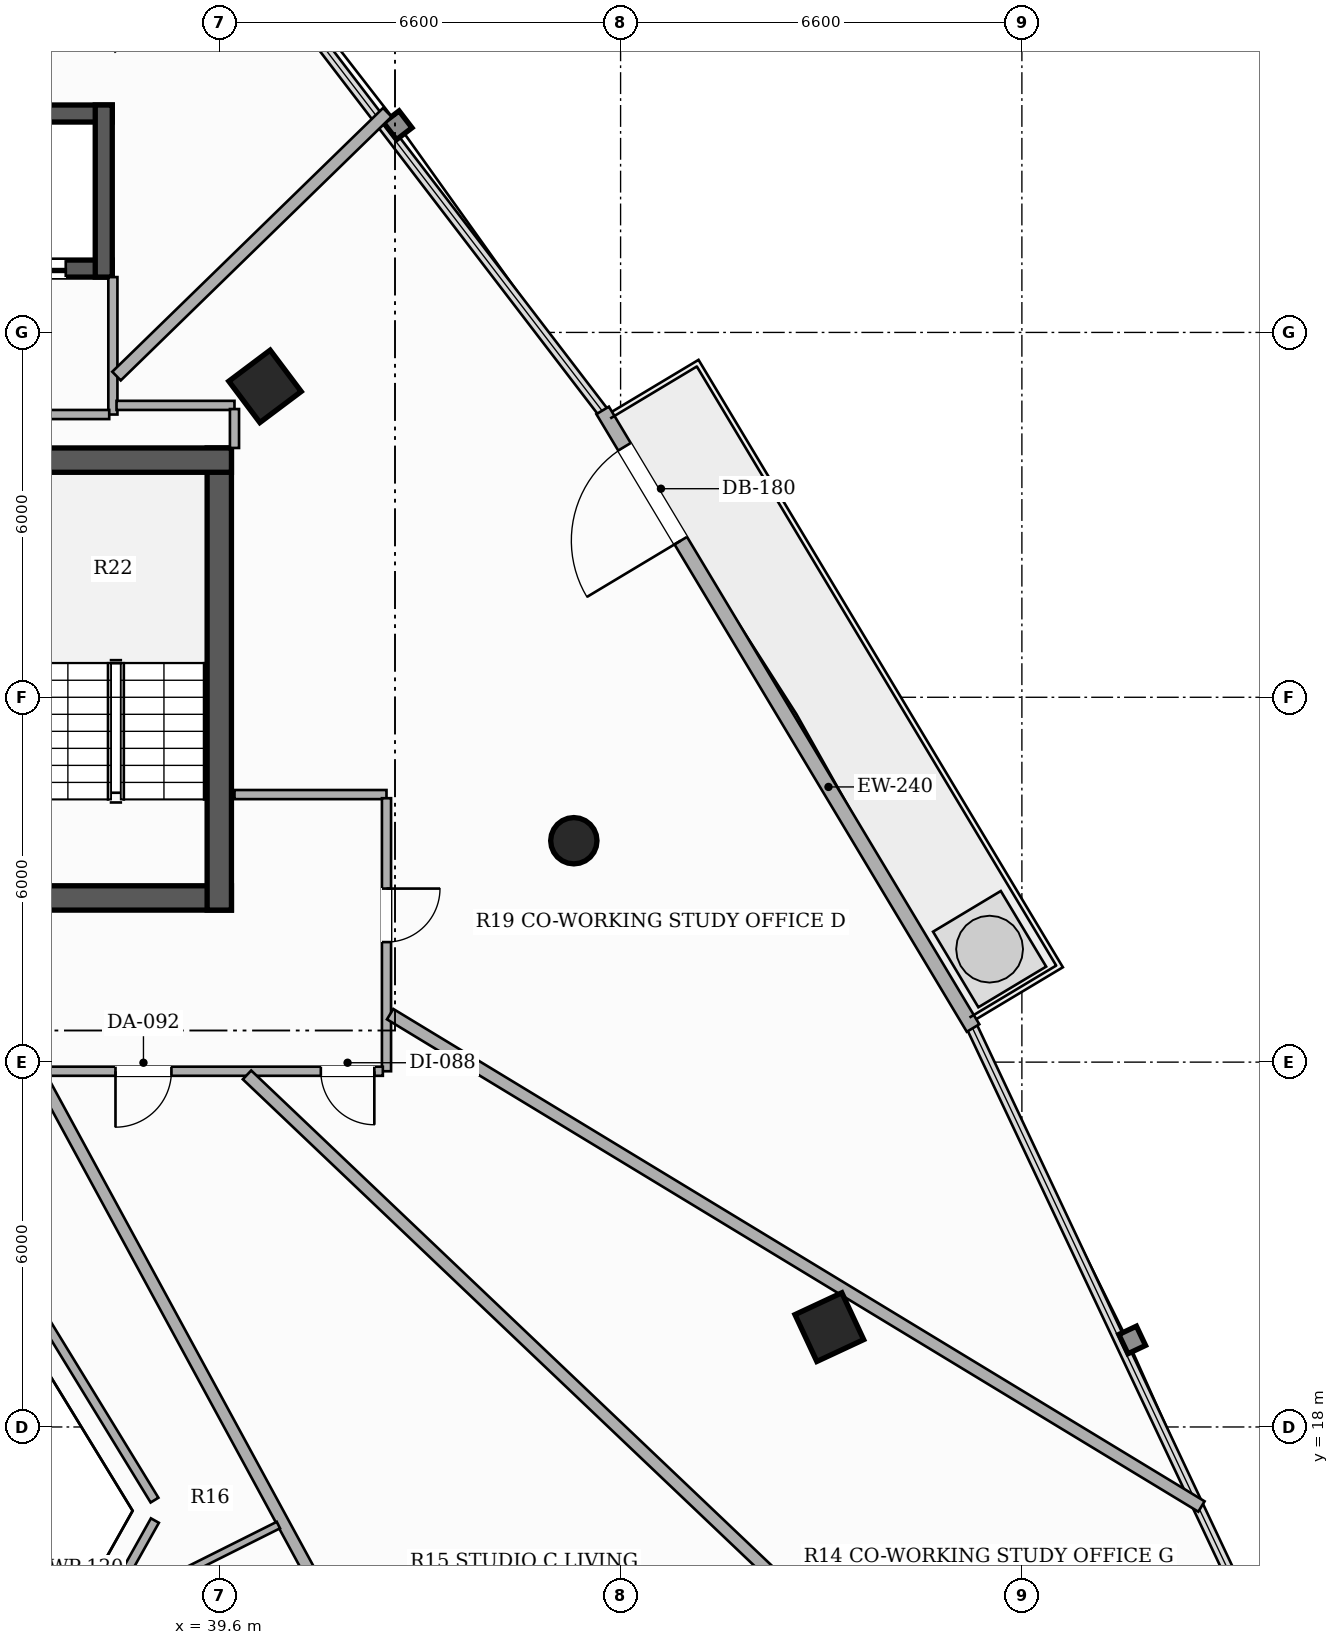
"""IFC4 building model, lengths in metres.
Left out: names, types, materials, properties, quantities, classifications, styles, units other than length and angle.
Written with IfcOpenShell. Run it as: python <this file> out.ifc"""

import sys

from ifc_helpers import new_model, si_unit, direction, frame, frame_2d, origin, origin_2d, place, context, subcontext, project, spatial, rectangle, hollow_rectangle, hollow_circle, extrude, element, fill, save


model = new_model("IFC4")
c1 = context("Model", 3, precision=1e-05, world=origin(), true_north=direction((0.0, 1.0)))
c2 = subcontext(c1, "Body", "Model", "MODEL_VIEW")
j1 = project(units=[si_unit("LENGTHUNIT", "METRE"), si_unit("PLANEANGLEUNIT", "RADIAN")], contexts=[c1])
p1 = place(None, origin())
s1 = spatial("IfcSite", under=j1, at=p1, CompositionType="ELEMENT")
p2 = place(p1, origin())
s2 = spatial("IfcBuilding", under=s1, at=p2, CompositionType="ELEMENT")
p3 = place(p2, frame((0.0, 0.0, 106.7)))
s3 = spatial("IfcBuildingStorey", under=s2, at=p3, CompositionType="ELEMENT", Elevation=106.7)
p4 = place(p3, frame((26.2, 26.7, 0.0), z_axis=(0.0, 0.0, 1.0), x_axis=(1.0, 0.0, 0.0)))
e1 = element("IfcWall", 1, at=p4, inside=s3, PredefinedType="SHEAR", context=c2, shape_type="SweptSolid", body=[
    extrude(rectangle(XDim=13.6, YDim=0.4, at=frame_2d((6.8, 0.0))), origin(), (0.0, 0.0, 1.0), 3.3),
])
p5 = place(p4, frame((4.35, 0.0, 0.0)))
e2 = element("IfcOpeningElement", 2, at=p5, cuts=e1, PredefinedType="OPENING", context=c2, shape_type="SweptSolid", body=[
    extrude(rectangle(XDim=1.05, YDim=2.15, at=frame_2d((0.525, 1.075))), frame((0.0, 0.21, 0.0), z_axis=(0.0, -1.0, 0.0), x_axis=(1.0, 0.0, 0.0)), (0.0, 0.0, 1.0), 0.42),
])
p6 = place(p4, frame((8.3, 0.0, 0.0)))
e3 = element("IfcOpeningElement", 3, at=p6, cuts=e1, PredefinedType="OPENING", context=c2, shape_type="SweptSolid", body=[
    extrude(rectangle(XDim=1.05, YDim=2.15, at=frame_2d((0.525, 1.075))), frame((0.0, 0.21, 0.0), z_axis=(0.0, -1.0, 0.0), x_axis=(1.0, 0.0, 0.0)), (0.0, 0.0, 1.0), 0.42),
])
p7 = place(p3, frame((39.6, 26.5, 0.0), z_axis=(0.0, 0.0, 1.0), x_axis=(0.0, 1.0, 0.0)))
e4 = element("IfcWall", 4, at=p7, inside=s3, PredefinedType="SHEAR", context=c2, shape_type="SweptSolid", body=[
    extrude(rectangle(XDim=7.6, YDim=0.4, at=frame_2d((3.8, 0.0))), origin(), (0.0, 0.0, 1.0), 3.3),
])
p8 = place(p3, frame((36.12, 33.9, 0.0), z_axis=(0.0, 0.0, 1.0), x_axis=(1.0, 0.0, 0.0)))
e5 = element("IfcWall", 5, at=p8, inside=s3, PredefinedType="SHEAR", context=c2, shape_type="SweptSolid", body=[
    extrude(rectangle(XDim=3.68, YDim=0.4, at=frame_2d((1.84, 0.0))), origin(), (0.0, 0.0, 1.0), 3.3),
])
p9 = place(p3, frame((37.84, 37.05, 0.0), z_axis=(0.0, 0.0, 1.0), x_axis=(-1.0, 0.0, 0.0)))
e6 = element("IfcWall", 6, at=p9, inside=s3, PredefinedType="SHEAR", context=c2, shape_type="SweptSolid", body=[
    extrude(rectangle(XDim=9.68, YDim=0.28, at=frame_2d((4.84, 0.0))), origin(), (0.0, 0.0, 1.0), 3.3),
])
p10 = place(p9, frame((7.815, 0.0, 0.0)))
e7 = element("IfcOpeningElement", 7, at=p10, cuts=e6, PredefinedType="OPENING", context=c2, shape_type="SweptSolid", body=[
    extrude(rectangle(XDim=1.1, YDim=2.2, at=frame_2d((0.55, 1.1))), frame((0.0, 0.15, 0.0), z_axis=(0.0, -1.0, 0.0), x_axis=(1.0, 0.0, 0.0)), (0.0, 0.0, 1.0), 0.3),
])
p11 = place(p9, frame((0.765, 0.0, 0.0)))
e8 = element("IfcOpeningElement", 8, at=p11, cuts=e6, PredefinedType="OPENING", context=c2, shape_type="SweptSolid", body=[
    extrude(rectangle(XDim=1.1, YDim=2.2, at=frame_2d((0.55, 1.1))), frame((0.0, 0.15, 0.0), z_axis=(0.0, -1.0, 0.0), x_axis=(1.0, 0.0, 0.0)), (0.0, 0.0, 1.0), 0.3),
])
p12 = place(p3, frame((28.16, 39.6, 0.0), z_axis=(0.0, 0.0, 1.0), x_axis=(1.0, 0.0, 0.0)))
e9 = element("IfcWall", 9, at=p12, inside=s3, PredefinedType="SHEAR", context=c2, shape_type="SweptSolid", body=[
    extrude(rectangle(XDim=9.68, YDim=0.28, at=frame_2d((4.84, 0.0))), origin(), (0.0, 0.0, 1.0), 3.3),
])
p13 = place(p3, frame((37.7, 36.91, 0.0), z_axis=(0.0, 0.0, 1.0), x_axis=(0.0, 1.0, 0.0)))
e10 = element("IfcWall", 10, at=p13, inside=s3, PredefinedType="SHEAR", context=c2, shape_type="SweptSolid", body=[
    extrude(rectangle(XDim=2.83, YDim=0.28, at=frame_2d((1.415, 0.0))), origin(), (0.0, 0.0, 1.0), 3.3),
])
p14 = place(p3, frame((49.633, 19.642, 0.0), z_axis=(0.0, 0.0, 1.0), x_axis=(-0.422618261741, 0.906307787037, 0.0)))
e11 = element("IfcColumn", 11, at=p14, inside=s3, PredefinedType="COLUMN", context=c2, shape_type="SweptSolid", body=[
    extrude(hollow_rectangle(XDim=0.85, YDim=0.85, WallThickness=0.028, at=origin_2d()), origin(), (0.0, 0.0, 1.0), 3.3),
])
p15 = place(p3, frame((45.431, 27.641, 0.0), z_axis=(0.0, 0.0, 1.0), x_axis=(1.0, 0.0, 0.0)))
e12 = element("IfcColumn", 12, at=p15, inside=s3, PredefinedType="COLUMN", context=c2, shape_type="SweptSolid", body=[
    extrude(hollow_circle(Radius=0.381, WallThickness=0.022, at=origin_2d()), origin(), (0.0, 0.0, 1.0), 3.3),
])
p16 = place(p3, frame((40.352, 35.113, 0.0), z_axis=(0.0, 0.0, 1.0), x_axis=(-0.600420225326, 0.799684658487, 0.0)))
e13 = element("IfcColumn", 13, at=p16, inside=s3, PredefinedType="COLUMN", context=c2, shape_type="SweptSolid", body=[
    extrude(hollow_rectangle(XDim=0.85, YDim=0.85, WallThickness=0.028, at=origin_2d()), origin(), (0.0, 0.0, 1.0), 3.3),
])
p17 = place(p3, frame((51.997, 24.561, 0.0), z_axis=(0.0, 0.0, 1.0), x_axis=(-0.514362369366, 0.857572943242, 0.0)))
e14 = element("IfcWall", 14, at=p17, inside=s3, PredefinedType="SOLIDWALL", context=c2, shape_type="SweptSolid", body=[
    extrude(rectangle(XDim=11.844, YDim=0.24, at=frame_2d((5.922, 0.0))), origin(), (0.0, 0.0, 1.0), 2.624),
])
p18 = place(p17, frame((9.346, 0.0, 0.0)))
e15 = element("IfcOpeningElement", 15, at=p18, cuts=e14, PredefinedType="OPENING", context=c2, shape_type="SweptSolid", body=[
    extrude(rectangle(XDim=1.8, YDim=2.2, at=frame_2d((0.9, 1.1))), frame((0.0, 0.13, 0.0), z_axis=(0.0, -1.0, 0.0), x_axis=(1.0, 0.0, 0.0)), (0.0, 0.0, 1.0), 0.26),
])
p19 = place(p3, frame((37.85, 34.65, 0.0), z_axis=(0.0, 0.0, 1.0), x_axis=(0.0, 1.0, 0.0)))
e16 = element("IfcWall", 16, at=p19, inside=s3, PredefinedType="PARTITIONING", context=c2, shape_type="SweptSolid", body=[
    extrude(rectangle(XDim=2.26, YDim=0.15, at=frame_2d((1.13, 0.0))), origin(), (0.0, 0.0, 1.0), 3.06),
])
p20 = place(p3, frame((36.385, 34.65, 0.0), z_axis=(0.0, 0.0, 1.0), x_axis=(1.0, 0.0, 0.0)))
e17 = element("IfcWall", 17, at=p20, inside=s3, PredefinedType="PARTITIONING", context=c2, shape_type="SweptSolid", body=[
    extrude(rectangle(XDim=1.405, YDim=0.15, at=frame_2d((0.703, 0.0))), origin(), (0.0, 0.0, 1.0), 2.425),
])
p21 = place(p3, frame((39.85, 28.4, 0.0), z_axis=(0.0, 0.0, 1.0), x_axis=(1.0, 0.0, 0.0)))
e18 = element("IfcWall", 18, at=p21, inside=s3, PredefinedType="PARTITIONING", context=c2, shape_type="SweptSolid", body=[
    extrude(rectangle(XDim=2.5, YDim=0.15, at=frame_2d((1.25, 0.0))), origin(), (0.0, 0.0, 1.0), 2.721),
])
p22 = place(p3, frame((42.35, 28.34, 0.0), z_axis=(0.0, 0.0, 1.0), x_axis=(0.0, -1.0, 0.0)))
e19 = element("IfcWall", 19, at=p22, inside=s3, PredefinedType="PARTITIONING", context=c2, shape_type="SweptSolid", body=[
    extrude(rectangle(XDim=4.49, YDim=0.15, at=frame_2d((2.245, 0.0))), origin(), (0.0, 0.0, 1.0), 2.721),
])
p23 = place(p22, frame((1.486, 0.0, 0.0)))
e20 = element("IfcOpeningElement", 20, at=p23, cuts=e19, PredefinedType="OPENING", context=c2, shape_type="SweptSolid", body=[
    extrude(rectangle(XDim=0.88, YDim=2.1, at=frame_2d((0.44, 1.05))), frame((0.0, 0.085, 0.0), z_axis=(0.0, -1.0, 0.0), x_axis=(1.0, 0.0, 0.0)), (0.0, 0.0, 1.0), 0.17),
])
p24 = place(p3, frame((42.29, 23.85, 0.0), z_axis=(0.0, 0.0, 1.0), x_axis=(-1.0, 0.0, 0.0)))
e21 = element("IfcWall", 21, at=p24, inside=s3, PredefinedType="PARTITIONING", context=c2, shape_type="SweptSolid", body=[
    extrude(rectangle(XDim=8.065, YDim=0.15, at=frame_2d((4.032, 0.0))), origin(), (0.0, 0.0, 1.0), 2.492),
])
p25 = place(p24, frame((3.477, 0.0, 0.0)))
e22 = element("IfcOpeningElement", 22, at=p25, cuts=e21, PredefinedType="OPENING", context=c2, shape_type="SweptSolid", body=[
    extrude(rectangle(XDim=0.92, YDim=2.15, at=frame_2d((0.46, 1.075))), frame((0.0, 0.085, 0.0), z_axis=(0.0, -1.0, 0.0), x_axis=(1.0, 0.0, 0.0)), (0.0, 0.0, 1.0), 0.17),
])
p26 = place(p24, frame((0.14, 0.0, 0.0)))
e23 = element("IfcOpeningElement", 23, at=p26, cuts=e21, PredefinedType="OPENING", context=c2, shape_type="SweptSolid", body=[
    extrude(rectangle(XDim=0.88, YDim=2.1, at=frame_2d((0.44, 1.05))), frame((0.0, 0.085, 0.0), z_axis=(0.0, -1.0, 0.0), x_axis=(1.0, 0.0, 0.0)), (0.0, 0.0, 1.0), 0.17),
])
p27 = place(p3, frame((37.91, 34.8, 0.0), z_axis=(0.0, 0.0, 1.0), x_axis=(1.0, 0.0, 0.0)))
e24 = element("IfcWall", 24, at=p27, inside=s3, PredefinedType="PARTITIONING", context=c2, shape_type="SweptSolid", body=[
    extrude(rectangle(XDim=1.94, YDim=0.15, at=frame_2d((0.97, 0.0))), origin(), (0.0, 0.0, 1.0), 2.721),
])
p28 = place(p3, frame((39.85, 34.74, 0.0), z_axis=(0.0, 0.0, 1.0), x_axis=(0.0, -1.0, 0.0)))
e25 = element("IfcWall", 25, at=p28, inside=s3, PredefinedType="PARTITIONING", context=c2, shape_type="SweptSolid", body=[
    extrude(rectangle(XDim=0.64, YDim=0.15, at=frame_2d((0.32, 0.0))), origin(), (0.0, 0.0, 1.0), 2.721),
])
p29 = place(p3, frame((34.257, 23.79, 0.0), z_axis=(0.0, 0.0, 1.0), x_axis=(0.521839061235, -0.853043957935, 0.0)))
e26 = element("IfcWall", 26, at=p29, inside=s3, PredefinedType="PARTITIONING", context=c2, shape_type="SweptSolid", body=[
    extrude(rectangle(XDim=8.198, YDim=0.15, at=frame_2d((4.099, 0.0))), origin(), (0.0, 0.0, 1.0), 2.721),
])
p30 = place(p3, frame((38.541, 16.461, 0.0), z_axis=(0.0, 0.0, 1.0), x_axis=(-0.488631416095, -0.872490308946, 0.0)))
e27 = element("IfcWall", 27, at=p30, inside=s3, PredefinedType="PARTITIONING", context=c2, shape_type="SweptSolid", body=[
    extrude(rectangle(XDim=1.06, YDim=0.15, at=frame_2d((0.53, 0.0))), origin(), (0.0, 0.0, 1.0), 3.06),
])
p31 = place(p3, frame((36.646, 23.79, 0.0), z_axis=(0.0, 0.0, 1.0), x_axis=(0.477391569207, -0.878690667784, 0.0)))
e28 = element("IfcWall", 28, at=p31, inside=s3, PredefinedType="PARTITIONING", context=c2, shape_type="SweptSolid", body=[
    extrude(rectangle(XDim=22.918, YDim=0.2, at=frame_2d((11.459, 0.0))), origin(), (0.0, 0.0, 1.0), 2.413),
])
p32 = place(p3, frame((40.056, 23.79, 0.0), z_axis=(0.0, 0.0, 1.0), x_axis=(0.724633427165, -0.68913452695, 0.0)))
e29 = element("IfcWall", 29, at=p32, inside=s3, PredefinedType="PARTITIONING", context=c2, shape_type="SweptSolid", body=[
    extrude(rectangle(XDim=25.921, YDim=0.2, at=frame_2d((12.96, 0.0))), origin(), (0.0, 0.0, 1.0), 2.413),
])
p33 = place(p3, frame((37.91, 35.282, 0.0), z_axis=(0.0, 0.0, 1.0), x_axis=(0.716392659664, 0.697697324905, 0.0)))
e30 = element("IfcWall", 30, at=p33, inside=s3, PredefinedType="PARTITIONING", context=c2, shape_type="SweptSolid", body=[
    extrude(rectangle(XDim=6.216, YDim=0.2, at=frame_2d((3.108, 0.0))), origin(), (0.0, 0.0, 1.0), 2.413),
])
p34 = place(p3, frame((55.753, 16.692, 0.0), z_axis=(0.0, 0.0, 1.0), x_axis=(-0.85489976131, 0.518793213248, 0.0)))
e31 = element("IfcWall", 31, at=p34, inside=s3, PredefinedType="PARTITIONING", context=c2, shape_type="SweptSolid", body=[
    extrude(rectangle(XDim=15.608, YDim=0.2, at=frame_2d((7.804, 0.0))), origin(), (0.0, 0.0, 1.0), 2.413),
])
p35 = place(p3, frame((40.572, 16.387, 0.0), z_axis=(0.0, 0.0, 1.0), x_axis=(-0.894178861749, -0.447709909653, 0.0)))
e32 = element("IfcWall", 32, at=p35, inside=s3, PredefinedType="PARTITIONING", context=c2, shape_type="SweptSolid", body=[
    extrude(rectangle(XDim=7.083, YDim=0.12, at=frame_2d((3.541, 0.0))), origin(), (0.0, 0.0, 1.0), 2.721),
])
p36 = place(p18, origin())
e33 = element("IfcDoor", 33, at=p36, inside=s3, OperationType="SINGLE_SWING_LEFT", PredefinedType="DOOR", context=c2, shape_type="SweptSolid", body=[
    extrude(rectangle(XDim=1.8, YDim=2.2, at=frame_2d((0.9, 1.1))), frame((0.0, 0.025, 0.0), z_axis=(0.0, -1.0, 0.0), x_axis=(1.0, 0.0, 0.0)), (0.0, 0.0, 1.0), 0.05),
])
fill(e15, e33)
p37 = place(p11, origin())
e34 = element("IfcDoor", 34, at=p37, inside=s3, OperationType="DOUBLE_DOOR_SLIDING", PredefinedType="DOOR", context=c2, shape_type="SweptSolid", body=[
    extrude(rectangle(XDim=1.1, YDim=2.2, at=frame_2d((0.55, 1.1))), frame((0.0, 0.025, 0.0), z_axis=(0.0, -1.0, 0.0), x_axis=(1.0, 0.0, 0.0)), (0.0, 0.0, 1.0), 0.05),
])
fill(e8, e34)
p38 = place(p25, origin())
e35 = element("IfcDoor", 35, at=p38, inside=s3, OperationType="SINGLE_SWING_RIGHT", PredefinedType="DOOR", context=c2, shape_type="SweptSolid", body=[
    extrude(rectangle(XDim=0.92, YDim=2.15, at=frame_2d((0.46, 1.075))), frame((0.0, 0.025, 0.0), z_axis=(0.0, -1.0, 0.0), x_axis=(1.0, 0.0, 0.0)), (0.0, 0.0, 1.0), 0.05),
])
fill(e22, e35)
p39 = place(p23, origin())
e36 = element("IfcDoor", 36, at=p39, inside=s3, OperationType="SINGLE_SWING_LEFT", PredefinedType="DOOR", context=c2, shape_type="SweptSolid", body=[
    extrude(rectangle(XDim=0.88, YDim=2.1, at=frame_2d((0.44, 1.05))), frame((0.0, 0.025, 0.0), z_axis=(0.0, -1.0, 0.0), x_axis=(1.0, 0.0, 0.0)), (0.0, 0.0, 1.0), 0.05),
])
fill(e20, e36)
p40 = place(p26, origin())
e37 = element("IfcDoor", 37, at=p40, inside=s3, OperationType="SINGLE_SWING_LEFT", PredefinedType="DOOR", context=c2, shape_type="SweptSolid", body=[
    extrude(rectangle(XDim=0.88, YDim=2.1, at=frame_2d((0.44, 1.05))), frame((0.0, 0.025, 0.0), z_axis=(0.0, -1.0, 0.0), x_axis=(1.0, 0.0, 0.0)), (0.0, 0.0, 1.0), 0.05),
])
fill(e23, e37)
save(model, sys.argv[1])
